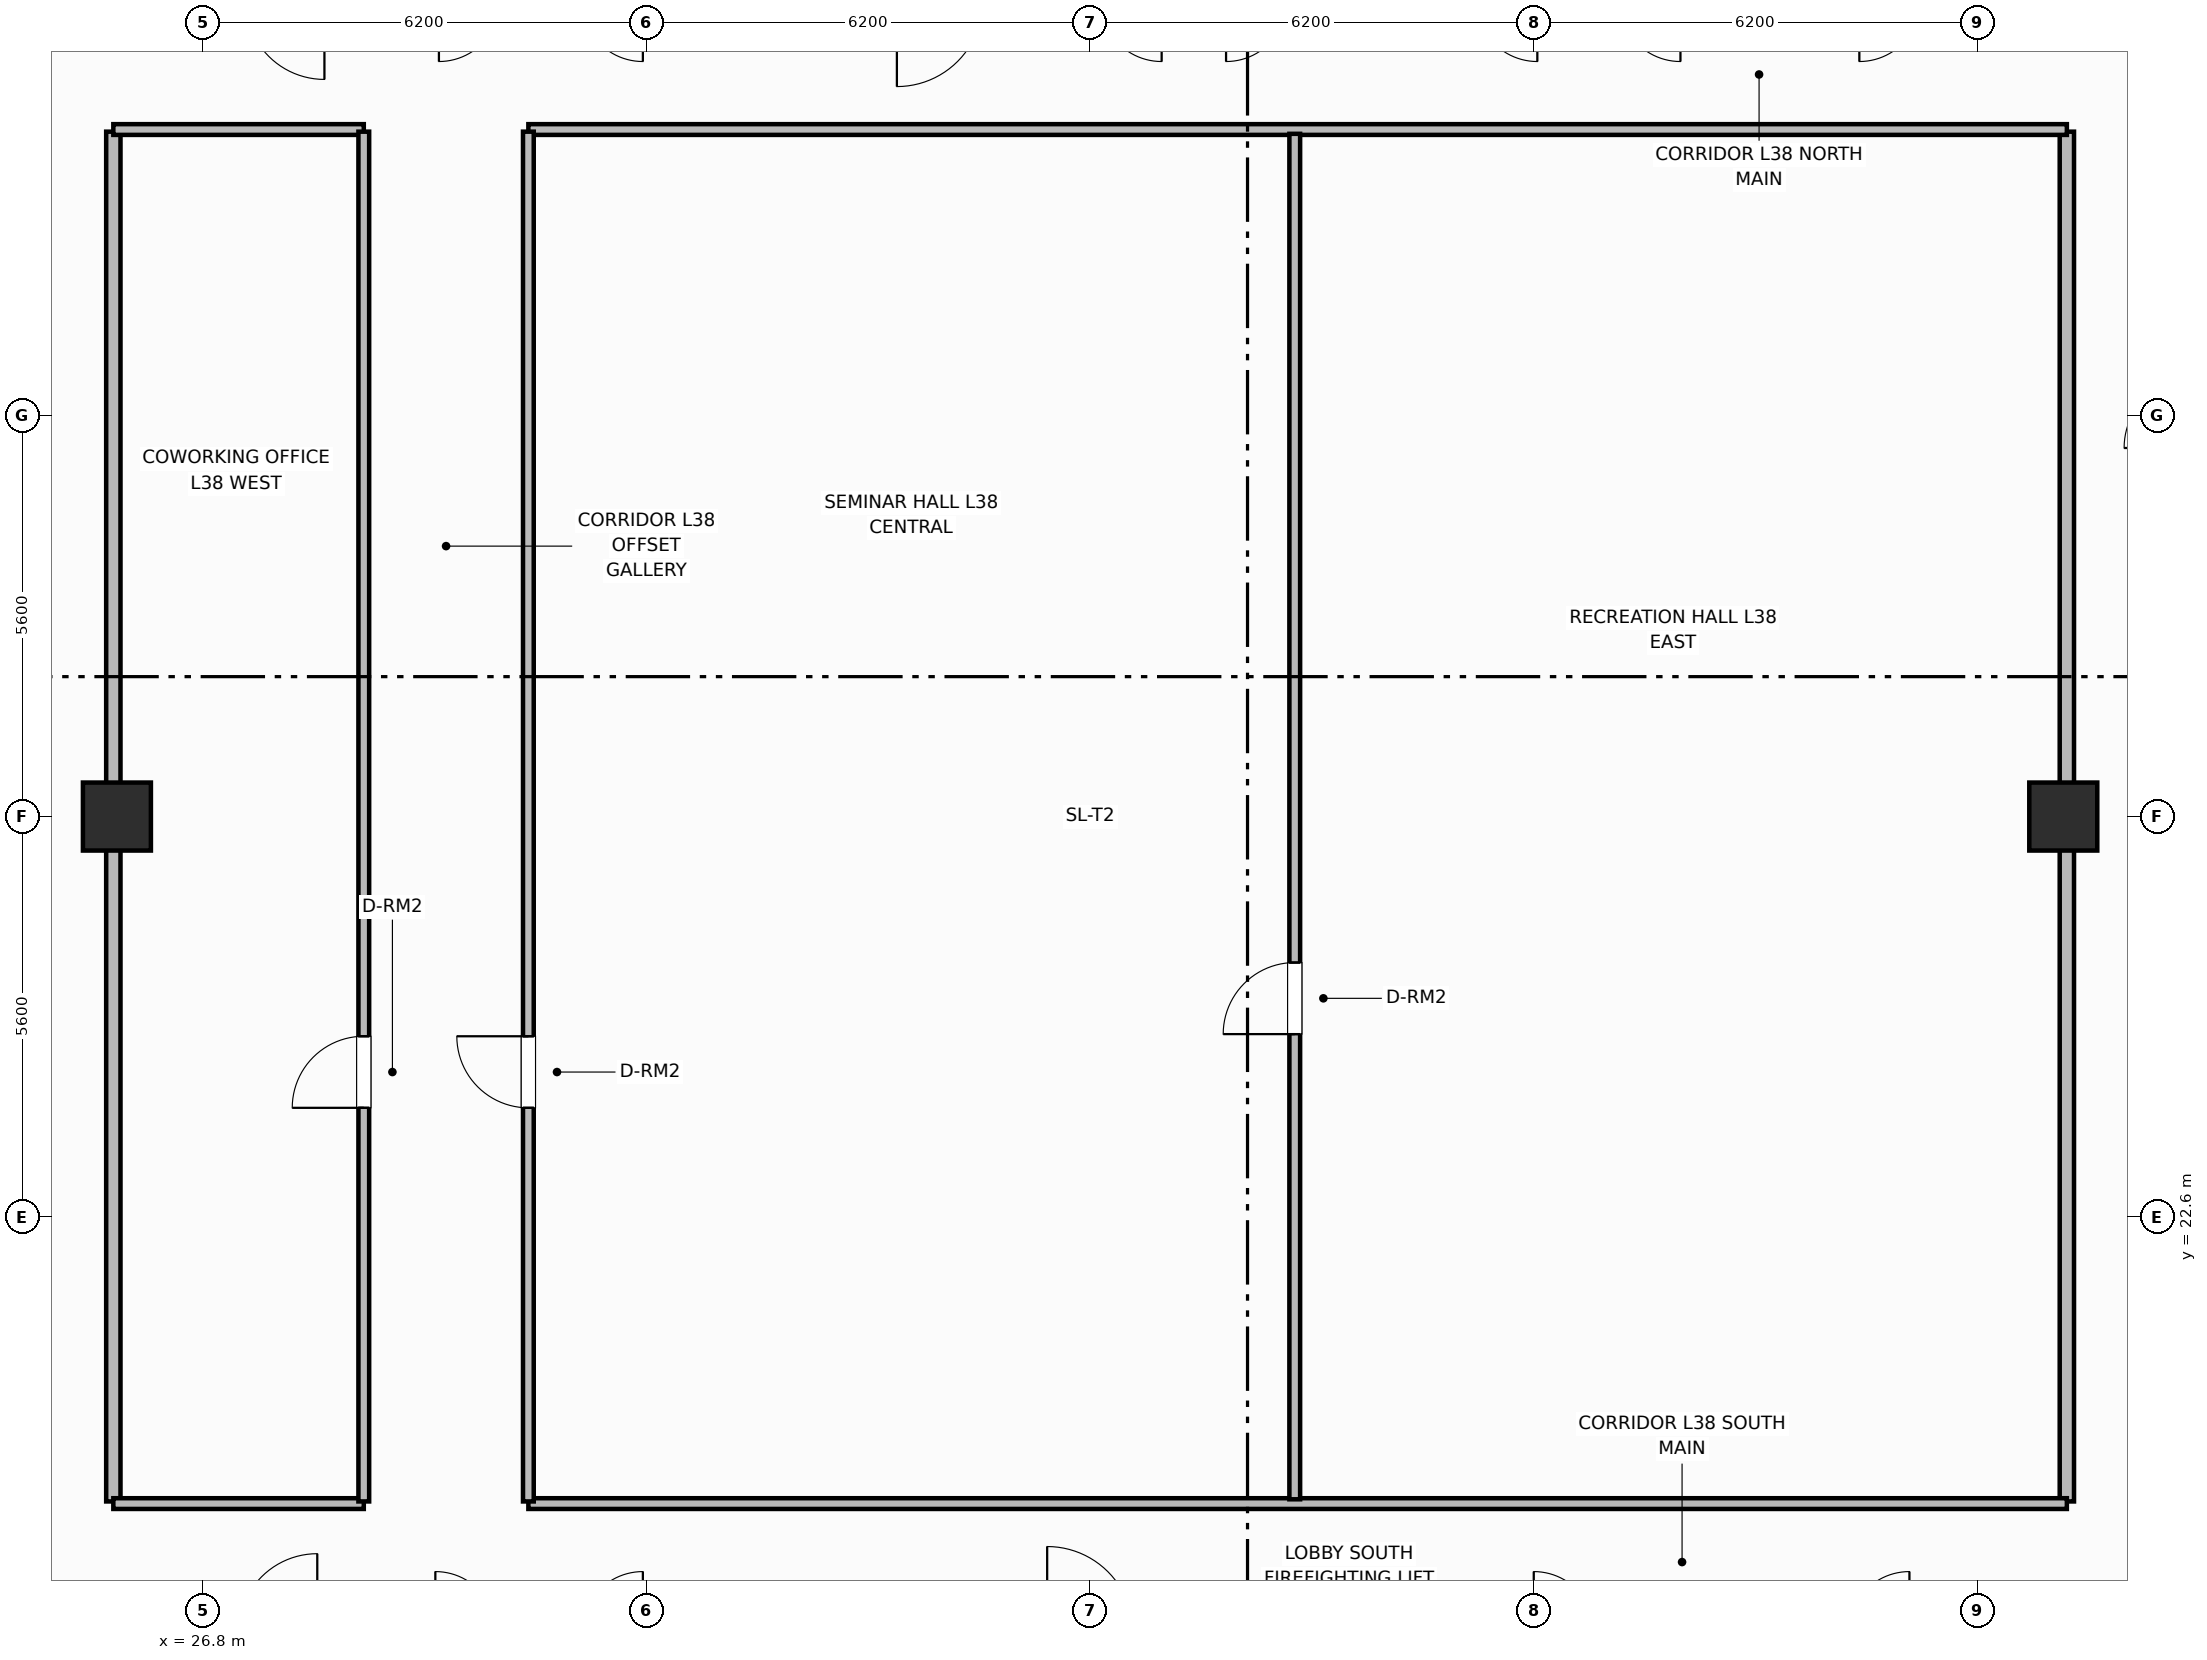
"""IFC4 building model, lengths in metres.
Left out: names, types, materials, properties, quantities, classifications, styles, units other than length and angle.
Written with IfcOpenShell. Run it as: python <this file> out.ifc"""

import sys

from ifc_helpers import new_model, si_unit, direction, frame, frame_2d, origin, origin_2d, place, context, subcontext, project, spatial, rectangle, extrude, element, fill, save


model = new_model("IFC4")
c1 = context("Model", 3, precision=1e-05, world=origin(), true_north=direction((0.0, 1.0)))
c2 = subcontext(c1, "Body", "Model", "MODEL_VIEW")
j1 = project(units=[si_unit("LENGTHUNIT", "METRE"), si_unit("PLANEANGLEUNIT", "RADIAN")], contexts=[c1])
p1 = place(None, origin())
s1 = spatial("IfcSite", under=j1, at=p1, CompositionType="ELEMENT")
p2 = place(p1, origin())
s2 = spatial("IfcBuilding", under=s1, at=p2, CompositionType="ELEMENT")
p3 = place(p2, frame((0.0, 0.0, 155.2)))
s3 = spatial("IfcBuildingStorey", under=s2, at=p3, CompositionType="ELEMENT", Elevation=155.2)
for number, where, z_axis, x_axis in (
    (1, (25.6, 28.2, 0.0), (0.0, 0.0, 1.0), (1.0, 0.0, 0.0)),
    (2, (52.8, 28.2, 0.0), (0.0, 0.0, 1.0), (1.0, 0.0, 0.0)),
):
    element("IfcColumn", number, at=place(p3, frame(where, z_axis=z_axis, x_axis=x_axis)), inside=s3, PredefinedType="COLUMN", context=c2, shape_type="SweptSolid", body=[
        extrude(rectangle(XDim=0.95, YDim=0.95, at=origin_2d()), origin(), (0.0, 0.0, 1.0), 3.7),
    ])
for number, where, z_axis, x_axis in (
    (3, (25.55, 18.63, 0.0), (0.0, 0.0, 1.0), (0.0, 1.0, 0.0)),
    (4, (52.85, 18.63, 0.0), (0.0, 0.0, 1.0), (0.0, 1.0, 0.0)),
):
    element("IfcWall", number, at=place(p3, frame(where, z_axis=z_axis, x_axis=x_axis)), inside=s3, PredefinedType="PARTITIONING", context=c2, shape_type="SweptSolid", body=[
        extrude(rectangle(XDim=19.14, YDim=0.2, at=frame_2d((9.57, 0.0))), origin(), (0.0, 0.0, 1.0), 2.55),
    ])
p4 = place(p3, frame((25.55, 18.6, 0.0), z_axis=(0.0, 0.0, 1.0), x_axis=(1.0, 0.0, 0.0)))
e5 = element("IfcWall", 5, at=p4, inside=s3, PredefinedType="PARTITIONING", context=c2, shape_type="SweptSolid", body=[
    extrude(rectangle(XDim=3.5, YDim=0.15, at=frame_2d((1.75, 0.0))), origin(), (0.0, 0.0, 1.0), 2.55),
])
p5 = place(p3, frame((31.35, 18.6, 0.0), z_axis=(0.0, 0.0, 1.0), x_axis=(1.0, 0.0, 0.0)))
e6 = element("IfcWall", 6, at=p5, inside=s3, PredefinedType="PARTITIONING", context=c2, shape_type="SweptSolid", body=[
    extrude(rectangle(XDim=21.5, YDim=0.15, at=frame_2d((10.75, 0.0))), origin(), (0.0, 0.0, 1.0), 2.55),
])
p6 = place(p3, frame((25.55, 37.8, 0.0), z_axis=(0.0, 0.0, 1.0), x_axis=(1.0, 0.0, 0.0)))
e7 = element("IfcWall", 7, at=p6, inside=s3, PredefinedType="PARTITIONING", context=c2, shape_type="SweptSolid", body=[
    extrude(rectangle(XDim=3.5, YDim=0.15, at=frame_2d((1.75, 0.0))), origin(), (0.0, 0.0, 1.0), 2.55),
])
p7 = place(p3, frame((31.35, 37.8, 0.0), z_axis=(0.0, 0.0, 1.0), x_axis=(1.0, 0.0, 0.0)))
e8 = element("IfcWall", 8, at=p7, inside=s3, PredefinedType="PARTITIONING", context=c2, shape_type="SweptSolid", body=[
    extrude(rectangle(XDim=21.5, YDim=0.15, at=frame_2d((10.75, 0.0))), origin(), (0.0, 0.0, 1.0), 2.55),
])
p8 = place(p3, frame((42.06, 18.66, 0.0), z_axis=(0.0, 0.0, 1.0), x_axis=(0.0, 1.0, 0.0)))
e9 = element("IfcWall", 9, at=p8, inside=s3, PredefinedType="PARTITIONING", context=c2, shape_type="SweptSolid", body=[
    extrude(rectangle(XDim=19.08, YDim=0.15, at=frame_2d((9.54, 0.0))), origin(), (0.0, 0.0, 1.0), 2.55),
])
p9 = place(p8, frame((6.5, 0.0, 0.0)))
e10 = element("IfcOpeningElement", 10, at=p9, cuts=e9, PredefinedType="OPENING", context=c2, shape_type="SweptSolid", body=[
    extrude(rectangle(XDim=1.0, YDim=2.15, at=frame_2d((0.5, 1.075))), frame((0.0, 0.085, 0.0), z_axis=(0.0, -1.0, 0.0), x_axis=(1.0, 0.0, 0.0)), (0.0, 0.0, 1.0), 0.17),
])
p10 = place(p3, frame((29.05, 18.63, 0.0), z_axis=(0.0, 0.0, 1.0), x_axis=(0.0, 1.0, 0.0)))
e11 = element("IfcWall", 11, at=p10, inside=s3, PredefinedType="PARTITIONING", context=c2, shape_type="SweptSolid", body=[
    extrude(rectangle(XDim=19.14, YDim=0.15, at=frame_2d((9.57, 0.0))), origin(), (0.0, 0.0, 1.0), 2.55),
])
p11 = place(p10, frame((5.5, 0.0, 0.0)))
e12 = element("IfcOpeningElement", 12, at=p11, cuts=e11, PredefinedType="OPENING", context=c2, shape_type="SweptSolid", body=[
    extrude(rectangle(XDim=1.0, YDim=2.15, at=frame_2d((0.5, 1.075))), frame((0.0, 0.085, 0.0), z_axis=(0.0, -1.0, 0.0), x_axis=(1.0, 0.0, 0.0)), (0.0, 0.0, 1.0), 0.17),
])
p12 = place(p3, frame((31.35, 18.63, 0.0), z_axis=(0.0, 0.0, 1.0), x_axis=(0.0, 1.0, 0.0)))
e13 = element("IfcWall", 13, at=p12, inside=s3, PredefinedType="PARTITIONING", context=c2, shape_type="SweptSolid", body=[
    extrude(rectangle(XDim=19.14, YDim=0.15, at=frame_2d((9.57, 0.0))), origin(), (0.0, 0.0, 1.0), 2.55),
])
p13 = place(p12, frame((5.5, 0.0, 0.0)))
e14 = element("IfcOpeningElement", 14, at=p13, cuts=e13, PredefinedType="OPENING", context=c2, shape_type="SweptSolid", body=[
    extrude(rectangle(XDim=1.0, YDim=2.15, at=frame_2d((0.5, 1.075))), frame((0.0, 0.085, 0.0), z_axis=(0.0, -1.0, 0.0), x_axis=(1.0, 0.0, 0.0)), (0.0, 0.0, 1.0), 0.17),
])
p14 = place(p9, origin())
e15 = element("IfcDoor", 15, at=p14, inside=s3, OperationType="SINGLE_SWING_LEFT", PredefinedType="DOOR", context=c2, shape_type="SweptSolid", body=[
    extrude(rectangle(XDim=1.0, YDim=2.15, at=frame_2d((0.5, 1.075))), frame((0.0, 0.025, 0.0), z_axis=(0.0, -1.0, 0.0), x_axis=(1.0, 0.0, 0.0)), (0.0, 0.0, 1.0), 0.05),
])
fill(e10, e15)
p15 = place(p11, origin())
e16 = element("IfcDoor", 16, at=p15, inside=s3, OperationType="SINGLE_SWING_LEFT", PredefinedType="DOOR", context=c2, shape_type="SweptSolid", body=[
    extrude(rectangle(XDim=1.0, YDim=2.15, at=frame_2d((0.5, 1.075))), frame((0.0, 0.025, 0.0), z_axis=(0.0, -1.0, 0.0), x_axis=(1.0, 0.0, 0.0)), (0.0, 0.0, 1.0), 0.05),
])
fill(e12, e16)
p16 = place(p13, origin())
e17 = element("IfcDoor", 17, at=p16, inside=s3, OperationType="SINGLE_SWING_RIGHT", PredefinedType="DOOR", context=c2, shape_type="SweptSolid", body=[
    extrude(rectangle(XDim=1.0, YDim=2.15, at=frame_2d((0.5, 1.075))), frame((0.0, 0.025, 0.0), z_axis=(0.0, -1.0, 0.0), x_axis=(1.0, 0.0, 0.0)), (0.0, 0.0, 1.0), 0.05),
])
fill(e14, e17)
save(model, sys.argv[1])
